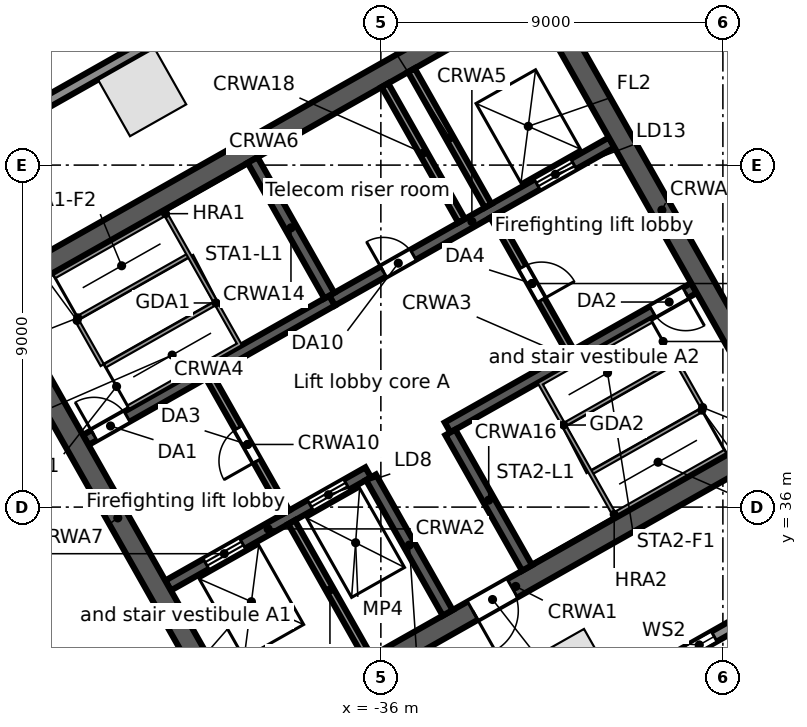
"""IFC4 building model, lengths in metres.
Left out: names, types, materials, properties, quantities, classifications, styles, units other than length and angle.
Written with IfcOpenShell. Run it as: python <this file> out.ifc"""

import sys

from ifc_helpers import new_model, si_unit, direction, frame, frame_2d, origin, origin_2d, place, context, subcontext, project, spatial, rectangle, extrude, element, fill, save


model = new_model("IFC4")
c1 = context("Model", 3, precision=1e-05, world=origin(), true_north=direction((0.0, 1.0)))
c2 = subcontext(c1, "Body", "Model", "MODEL_VIEW")
j1 = project(units=[si_unit("LENGTHUNIT", "METRE"), si_unit("PLANEANGLEUNIT", "RADIAN")], contexts=[c1])
p1 = place(None, origin())
s1 = spatial("IfcSite", under=j1, at=p1, CompositionType="ELEMENT")
p2 = place(p1, origin())
s2 = spatial("IfcBuilding", under=s1, at=p2, CompositionType="ELEMENT")
p3 = place(p2, frame((0.0, 0.0, 123.5)))
s3 = spatial("IfcBuildingStorey", under=s2, at=p3, CompositionType="ELEMENT", Elevation=123.5)
for number, where, z_axis, x_axis in (
    (1, (-42.28, 46.919, 0.0), (0.0, 0.0, 1.0), (-0.87, -0.492, 0.0)),
    (2, (-30.976, 31.635, 0.0), (0.0, 0.0, 1.0), (0.87, 0.492, 0.0)),
):
    element("IfcColumn", number, at=place(p3, frame(where, z_axis=z_axis, x_axis=x_axis)), inside=s3, PredefinedType="COLUMN", context=c2, shape_type="SweptSolid", body=[
        extrude(rectangle(XDim=1.7, YDim=1.7, at=origin_2d()), origin(), (0.0, 0.0, 1.0), 4.4),
    ])
p4 = place(p3, frame((-58.745, 38.764, 0.0), z_axis=(0.0, 0.0, 1.0), x_axis=(0.870355811726, 0.492423355453, 0.0)))
e3 = element("IfcWall", 3, at=p4, inside=s3, PredefinedType="STANDARD", context=c2, shape_type="SweptSolid", body=[
    extrude(rectangle(XDim=64.025, YDim=0.3, at=frame_2d((32.013, 0.0))), origin(), (0.0, 0.0, 1.0), 4.08),
])
p5 = place(p4, frame((60.122, 0.0, 0.6)))
e4 = element("IfcOpeningElement", 4, at=p5, cuts=e3, PredefinedType="OPENING", context=c2, shape_type="SweptSolid", body=[
    extrude(rectangle(XDim=0.9, YDim=2.8, at=frame_2d((0.45, 1.4))), frame((0.0, 0.16, 0.0), z_axis=(0.0, -1.0, 0.0), x_axis=(1.0, 0.0, 0.0)), (0.0, 0.0, 1.0), 0.32),
])
p6 = place(p4, frame((50.992, 0.0, 0.6)))
e5 = element("IfcOpeningElement", 5, at=p6, cuts=e3, PredefinedType="OPENING", context=c2, shape_type="SweptSolid", body=[
    extrude(rectangle(XDim=0.9, YDim=2.8, at=frame_2d((0.45, 1.4))), frame((0.0, 0.16, 0.0), z_axis=(0.0, -1.0, 0.0), x_axis=(1.0, 0.0, 0.0)), (0.0, 0.0, 1.0), 0.32),
])
p7 = place(p4, frame((41.862, 0.0, 0.6)))
e6 = element("IfcOpeningElement", 6, at=p7, cuts=e3, PredefinedType="OPENING", context=c2, shape_type="SweptSolid", body=[
    extrude(rectangle(XDim=0.9, YDim=2.8, at=frame_2d((0.45, 1.4))), frame((0.0, 0.16, 0.0), z_axis=(0.0, -1.0, 0.0), x_axis=(1.0, 0.0, 0.0)), (0.0, 0.0, 1.0), 0.32),
])
p8 = place(p4, frame((32.732, 0.0, 0.6)))
e7 = element("IfcOpeningElement", 7, at=p8, cuts=e3, PredefinedType="OPENING", context=c2, shape_type="SweptSolid", body=[
    extrude(rectangle(XDim=0.9, YDim=2.8, at=frame_2d((0.45, 1.4))), frame((0.0, 0.16, 0.0), z_axis=(0.0, -1.0, 0.0), x_axis=(1.0, 0.0, 0.0)), (0.0, 0.0, 1.0), 0.32),
])
p9 = place(p4, frame((23.602, 0.0, 0.6)))
e8 = element("IfcOpeningElement", 8, at=p9, cuts=e3, PredefinedType="OPENING", context=c2, shape_type="SweptSolid", body=[
    extrude(rectangle(XDim=0.9, YDim=2.8, at=frame_2d((0.45, 1.4))), frame((0.0, 0.16, 0.0), z_axis=(0.0, -1.0, 0.0), x_axis=(1.0, 0.0, 0.0)), (0.0, 0.0, 1.0), 0.32),
])
p10 = place(p4, frame((14.472, 0.0, 0.6)))
e9 = element("IfcOpeningElement", 9, at=p10, cuts=e3, PredefinedType="OPENING", context=c2, shape_type="SweptSolid", body=[
    extrude(rectangle(XDim=0.9, YDim=2.8, at=frame_2d((0.45, 1.4))), frame((0.0, 0.16, 0.0), z_axis=(0.0, -1.0, 0.0), x_axis=(1.0, 0.0, 0.0)), (0.0, 0.0, 1.0), 0.32),
])
p11 = place(p4, frame((5.342, 0.0, 0.6)))
e10 = element("IfcOpeningElement", 10, at=p11, cuts=e3, PredefinedType="OPENING", context=c2, shape_type="SweptSolid", body=[
    extrude(rectangle(XDim=0.9, YDim=2.8, at=frame_2d((0.45, 1.4))), frame((0.0, 0.16, 0.0), z_axis=(0.0, -1.0, 0.0), x_axis=(1.0, 0.0, 0.0)), (0.0, 0.0, 1.0), 0.32),
])
p12 = place(p3, frame((-44.109, 26.504, 0.0), z_axis=(0.0, 0.0, 1.0), x_axis=(-0.857169502585, 0.515034410344, 0.0)))
e11 = element("IfcWall", 11, at=p12, inside=s3, PredefinedType="STANDARD", context=c2, shape_type="SweptSolid", body=[
    extrude(rectangle(XDim=17.127, YDim=0.3, at=frame_2d((8.563, 0.0))), origin(), (0.0, 0.0, 1.0), 4.08),
])
p13 = place(p12, frame((13.403, 0.0, 0.6)))
e12 = element("IfcOpeningElement", 12, at=p13, cuts=e11, PredefinedType="OPENING", context=c2, shape_type="SweptSolid", body=[
    extrude(rectangle(XDim=0.9, YDim=2.8, at=frame_2d((0.45, 1.4))), frame((0.0, 0.16, 0.0), z_axis=(0.0, -1.0, 0.0), x_axis=(1.0, 0.0, 0.0)), (0.0, 0.0, 1.0), 0.32),
])
p14 = place(p12, frame((4.903, 0.0, 0.6)))
e13 = element("IfcOpeningElement", 13, at=p14, cuts=e11, PredefinedType="OPENING", context=c2, shape_type="SweptSolid", body=[
    extrude(rectangle(XDim=0.9, YDim=2.8, at=frame_2d((0.45, 1.4))), frame((0.0, 0.16, 0.0), z_axis=(0.0, -1.0, 0.0), x_axis=(1.0, 0.0, 0.0)), (0.0, 0.0, 1.0), 0.32),
])
p15 = place(p3, frame((-0.055, 47.969, 0.0), z_axis=(0.0, 0.0, 1.0), x_axis=(-0.870355730478, -0.492423499058, 0.0)))
e14 = element("IfcWall", 14, at=p15, inside=s3, PredefinedType="STANDARD", context=c2, shape_type="SweptSolid", body=[
    extrude(rectangle(XDim=43.75, YDim=0.3, at=frame_2d((21.875, 0.0))), origin(), (0.0, 0.0, 1.0), 4.08),
])
p16 = place(p15, frame((39.977, 0.0, 0.6)))
e15 = element("IfcOpeningElement", 15, at=p16, cuts=e14, PredefinedType="OPENING", context=c2, shape_type="SweptSolid", body=[
    extrude(rectangle(XDim=0.9, YDim=2.8, at=frame_2d((0.45, 1.4))), frame((0.0, 0.16, 0.0), z_axis=(0.0, -1.0, 0.0), x_axis=(1.0, 0.0, 0.0)), (0.0, 0.0, 1.0), 0.32),
])
p17 = place(p15, frame((31.222, 0.0, 0.6)))
e16 = element("IfcOpeningElement", 16, at=p17, cuts=e14, PredefinedType="OPENING", context=c2, shape_type="SweptSolid", body=[
    extrude(rectangle(XDim=0.9, YDim=2.8, at=frame_2d((0.45, 1.4))), frame((0.0, 0.16, 0.0), z_axis=(0.0, -1.0, 0.0), x_axis=(1.0, 0.0, 0.0)), (0.0, 0.0, 1.0), 0.32),
])
p18 = place(p15, frame((22.468, 0.0, 0.6)))
e17 = element("IfcOpeningElement", 17, at=p18, cuts=e14, PredefinedType="OPENING", context=c2, shape_type="SweptSolid", body=[
    extrude(rectangle(XDim=0.9, YDim=2.8, at=frame_2d((0.45, 1.4))), frame((0.0, 0.16, 0.0), z_axis=(0.0, -1.0, 0.0), x_axis=(1.0, 0.0, 0.0)), (0.0, 0.0, 1.0), 0.32),
])
p19 = place(p15, frame((13.713, 0.0, 0.6)))
e18 = element("IfcOpeningElement", 18, at=p19, cuts=e14, PredefinedType="OPENING", context=c2, shape_type="SweptSolid", body=[
    extrude(rectangle(XDim=0.9, YDim=2.8, at=frame_2d((0.45, 1.4))), frame((0.0, 0.16, 0.0), z_axis=(0.0, -1.0, 0.0), x_axis=(1.0, 0.0, 0.0)), (0.0, 0.0, 1.0), 0.32),
])
p20 = place(p15, frame((4.959, 0.0, 0.6)))
e19 = element("IfcOpeningElement", 19, at=p20, cuts=e14, PredefinedType="OPENING", context=c2, shape_type="SweptSolid", body=[
    extrude(rectangle(XDim=0.9, YDim=2.8, at=frame_2d((0.45, 1.4))), frame((0.0, 0.16, 0.0), z_axis=(0.0, -1.0, 0.0), x_axis=(1.0, 0.0, 0.0)), (0.0, 0.0, 1.0), 0.32),
])
p21 = place(p3, frame((-39.85, 29.727, 0.0), z_axis=(0.0, 0.0, 1.0), x_axis=(0.870359753402, 0.492416388494, 0.0)))
e20 = element("IfcWall", 20, at=p21, inside=s3, PredefinedType="SOLIDWALL", context=c2, shape_type="SweptSolid", body=[
    extrude(rectangle(XDim=17.0, YDim=0.55, at=frame_2d((8.5, 0.0))), origin(), (0.0, 0.0, 1.0), 4.08),
])
p22 = place(p21, frame((7.2, 0.0, 0.0)))
e21 = element("IfcOpeningElement", 21, at=p22, cuts=e20, PredefinedType="OPENING", context=c2, shape_type="SweptSolid", body=[
    extrude(rectangle(XDim=1.2, YDim=2.1, at=frame_2d((0.6, 1.05))), frame((0.0, 0.285, 0.0), z_axis=(0.0, -1.0, 0.0), x_axis=(1.0, 0.0, 0.0)), (0.0, 0.0, 1.0), 0.57),
])
p23 = place(p3, frame((-41.6, 33.936, 0.0), z_axis=(0.0, 0.0, 1.0), x_axis=(0.870348557882, 0.492436176365, 0.0)))
e22 = element("IfcWall", 22, at=p23, inside=s3, PredefinedType="SOLIDWALL", context=c2, shape_type="SweptSolid", body=[
    extrude(rectangle(XDim=6.05, YDim=0.3, at=frame_2d((3.025, 0.0))), origin(), (0.0, 0.0, 1.0), 4.08),
])
p24 = place(p23, frame((1.15, 0.0, 0.0)))
e23 = element("IfcOpeningElement", 23, at=p24, cuts=e22, PredefinedType="OPENING", context=c2, shape_type="SweptSolid", body=[
    extrude(rectangle(XDim=1.1, YDim=2.1, at=frame_2d((0.55, 1.05))), frame((0.0, 0.16, 0.0), z_axis=(0.0, -1.0, 0.0), x_axis=(1.0, 0.0, 0.0)), (0.0, 0.0, 1.0), 0.32),
])
p25 = place(p23, frame((4.3, 0.0, 0.0)))
e24 = element("IfcOpeningElement", 24, at=p25, cuts=e22, PredefinedType="OPENING", context=c2, shape_type="SweptSolid", body=[
    extrude(rectangle(XDim=1.1, YDim=2.1, at=frame_2d((0.55, 1.05))), frame((0.0, 0.16, 0.0), z_axis=(0.0, -1.0, 0.0), x_axis=(1.0, 0.0, 0.0)), (0.0, 0.0, 1.0), 0.32),
])
p26 = place(p3, frame((-34.245, 38.097, 0.0), z_axis=(0.0, 0.0, 1.0), x_axis=(0.870360741098, 0.49241464271, 0.0)))
e25 = element("IfcWall", 25, at=p26, inside=s3, PredefinedType="SOLIDWALL", context=c2, shape_type="SweptSolid", body=[
    extrude(rectangle(XDim=7.45, YDim=0.3, at=frame_2d((3.725, 0.0))), origin(), (0.0, 0.0, 1.0), 4.08),
])
p27 = place(p26, frame((6.2, 0.0, 0.0)))
e26 = element("IfcOpeningElement", 26, at=p27, cuts=e25, PredefinedType="OPENING", context=c2, shape_type="SweptSolid", body=[
    extrude(rectangle(XDim=1.0, YDim=2.1, at=frame_2d((0.5, 1.05))), frame((0.0, 0.16, 0.0), z_axis=(0.0, -1.0, 0.0), x_axis=(1.0, 0.0, 0.0)), (0.0, 0.0, 1.0), 0.32),
])
p28 = place(p3, frame((-43.766, 37.766, 0.0), z_axis=(0.0, 0.0, 1.0), x_axis=(0.870346696097, 0.492439466932, 0.0)))
e27 = element("IfcWall", 27, at=p28, inside=s3, PredefinedType="SOLIDWALL", context=c2, shape_type="SweptSolid", body=[
    extrude(rectangle(XDim=7.45, YDim=0.3, at=frame_2d((3.725, 0.0))), origin(), (0.0, 0.0, 1.0), 4.08),
])
p29 = place(p28, frame((0.25, 0.0, 0.0)))
e28 = element("IfcOpeningElement", 28, at=p29, cuts=e27, PredefinedType="OPENING", context=c2, shape_type="SweptSolid", body=[
    extrude(rectangle(XDim=1.0, YDim=2.1, at=frame_2d((0.5, 1.05))), frame((0.0, 0.16, 0.0), z_axis=(0.0, -1.0, 0.0), x_axis=(1.0, 0.0, 0.0)), (0.0, 0.0, 1.0), 0.32),
])
p30 = place(p3, frame((-37.282, 41.435, 0.0), z_axis=(0.0, 0.0, 1.0), x_axis=(0.870359895813, 0.492416136779, 0.0)))
e29 = element("IfcWall", 29, at=p30, inside=s3, PredefinedType="SOLIDWALL", context=c2, shape_type="SweptSolid", body=[
    extrude(rectangle(XDim=8.45, YDim=0.3, at=frame_2d((4.225, 0.0))), origin(), (0.0, 0.0, 1.0), 4.08),
])
p31 = place(p30, frame((6.2, 0.0, 0.0)))
e30 = element("IfcOpeningElement", 30, at=p31, cuts=e29, PredefinedType="OPENING", context=c2, shape_type="SweptSolid", body=[
    extrude(rectangle(XDim=1.1, YDim=2.1, at=frame_2d((0.55, 1.05))), frame((0.0, 0.16, 0.0), z_axis=(0.0, -1.0, 0.0), x_axis=(1.0, 0.0, 0.0)), (0.0, 0.0, 1.0), 0.32),
])
p32 = place(p30, frame((1.55, 0.0, 0.0)))
e31 = element("IfcOpeningElement", 31, at=p32, cuts=e29, PredefinedType="OPENING", context=c2, shape_type="SweptSolid", body=[
    extrude(rectangle(XDim=0.9, YDim=2.1, at=frame_2d((0.45, 1.05))), frame((0.0, 0.16, 0.0), z_axis=(0.0, -1.0, 0.0), x_axis=(1.0, 0.0, 0.0)), (0.0, 0.0, 1.0), 0.32),
])
p33 = place(p3, frame((-46.473, 41.434, 0.0), z_axis=(0.0, 0.0, 1.0), x_axis=(0.870359753402, 0.492416388494, 0.0)))
e32 = element("IfcWall", 32, at=p33, inside=s3, PredefinedType="SOLIDWALL", context=c2, shape_type="SweptSolid", body=[
    extrude(rectangle(XDim=17.0, YDim=0.55, at=frame_2d((8.5, 0.0))), origin(), (0.0, 0.0, 1.0), 4.08),
])
p34 = place(p3, frame((-46.098, 41.33, 0.0), z_axis=(0.0, 0.0, 1.0), x_axis=(0.492418910884, -0.870358326325, 0.0)))
e33 = element("IfcWall", 33, at=p34, inside=s3, PredefinedType="SOLIDWALL", context=c2, shape_type="SweptSolid", body=[
    extrude(rectangle(XDim=12.9, YDim=0.55, at=frame_2d((6.45, 0.0))), origin(), (0.0, 0.0, 1.0), 4.08),
])
p35 = place(p3, frame((-38.349, 35.603, 0.0), z_axis=(0.0, 0.0, 1.0), x_axis=(0.492382931784, -0.870378681085, 0.0)))
e34 = element("IfcWall", 34, at=p35, inside=s3, PredefinedType="SOLIDWALL", context=c2, shape_type="SweptSolid", body=[
    extrude(rectangle(XDim=4.1, YDim=0.2, at=frame_2d((2.05, 0.0))), origin(), (0.0, 0.0, 1.0), 4.08),
])
p36 = place(p3, frame((-40.516, 39.433, 0.0), z_axis=(0.0, 0.0, 1.0), x_axis=(0.492453559952, -0.87033872216, 0.0)))
e35 = element("IfcWall", 35, at=p36, inside=s3, PredefinedType="PARTITIONING", context=c2, shape_type="SweptSolid", body=[
    extrude(rectangle(XDim=4.1, YDim=0.2, at=frame_2d((2.05, 0.0))), origin(), (0.0, 0.0, 1.0), 4.08),
])
p37 = place(p36, frame((1.55, 0.0, 0.0)))
e36 = element("IfcOpeningElement", 36, at=p37, cuts=e35, PredefinedType="OPENING", context=c2, shape_type="SweptSolid", body=[
    extrude(rectangle(XDim=1.0, YDim=2.1, at=frame_2d((0.5, 1.05))), frame((0.0, 0.11, 0.0), z_axis=(0.0, -1.0, 0.0), x_axis=(1.0, 0.0, 0.0)), (0.0, 0.0, 1.0), 0.22),
])
p38 = place(p3, frame((-36.26, 36.785, 0.0), z_axis=(0.0, 0.0, 1.0), x_axis=(0.492408451753, -0.87036424366, 0.0)))
e37 = element("IfcWall", 37, at=p38, inside=s3, PredefinedType="SOLIDWALL", context=c2, shape_type="SweptSolid", body=[
    extrude(rectangle(XDim=4.1, YDim=0.3, at=frame_2d((2.05, 0.0))), origin(), (0.0, 0.0, 1.0), 4.08),
])
for number, where, z_axis, x_axis in (
    (38, (-39.375, 45.134, 0.0), (0.0, 0.0, 1.0), (0.492, -0.87, 0.0)),
    (39, (-34.171, 37.967, 0.0), (0.0, 0.0, 1.0), (0.492, -0.87, 0.0)),
):
    element("IfcWall", number, at=place(p3, frame(where, z_axis=z_axis, x_axis=x_axis)), inside=s3, PredefinedType="SOLIDWALL", context=c2, shape_type="SweptSolid", body=[
        extrude(rectangle(XDim=4.1, YDim=0.3, at=frame_2d((2.05, 0.0))), origin(), (0.0, 0.0, 1.0), 4.08),
    ])
p39 = place(p3, frame((-35.894, 47.103, 0.0), z_axis=(0.0, 0.0, 1.0), x_axis=(0.492428039142, -0.870353161807, 0.0)))
e40 = element("IfcWall", 40, at=p39, inside=s3, PredefinedType="SOLIDWALL", context=c2, shape_type="SweptSolid", body=[
    extrude(rectangle(XDim=4.1, YDim=0.2, at=frame_2d((2.05, 0.0))), origin(), (0.0, 0.0, 1.0), 4.08),
])
p40 = place(p3, frame((-33.031, 43.667, 0.0), z_axis=(0.0, 0.0, 1.0), x_axis=(0.492408451753, -0.87036424366, 0.0)))
e41 = element("IfcWall", 41, at=p40, inside=s3, PredefinedType="PARTITIONING", context=c2, shape_type="SweptSolid", body=[
    extrude(rectangle(XDim=4.1, YDim=0.2, at=frame_2d((2.05, 0.0))), origin(), (0.0, 0.0, 1.0), 4.08),
])
p41 = place(p40, frame((1.55, 0.0, 0.0)))
e42 = element("IfcOpeningElement", 42, at=p41, cuts=e41, PredefinedType="OPENING", context=c2, shape_type="SweptSolid", body=[
    extrude(rectangle(XDim=1.0, YDim=2.1, at=frame_2d((0.5, 1.05))), frame((0.0, 0.11, 0.0), z_axis=(0.0, -1.0, 0.0), x_axis=(1.0, 0.0, 0.0)), (0.0, 0.0, 1.0), 0.22),
])
p42 = place(p3, frame((-35.197, 47.497, 0.0), z_axis=(0.0, 0.0, 1.0), x_axis=(0.492453559952, -0.87033872216, 0.0)))
e43 = element("IfcWall", 43, at=p42, inside=s3, PredefinedType="SOLIDWALL", context=c2, shape_type="SweptSolid", body=[
    extrude(rectangle(XDim=4.1, YDim=0.2, at=frame_2d((2.05, 0.0))), origin(), (0.0, 0.0, 1.0), 4.08),
])
p43 = place(p3, frame((-31.781, 49.43, 0.0), z_axis=(0.0, 0.0, 1.0), x_axis=(0.492427022044, -0.870353737259, 0.0)))
e44 = element("IfcWall", 44, at=p43, inside=s3, PredefinedType="SOLIDWALL", context=c2, shape_type="SweptSolid", body=[
    extrude(rectangle(XDim=12.9, YDim=0.55, at=frame_2d((6.45, 0.0))), origin(), (0.0, 0.0, 1.0), 4.08),
])
p44 = place(p17, origin())
e45 = element("IfcWindow", 45, at=p44, inside=s3, PartitioningType="SINGLE_PANEL", PredefinedType="WINDOW", context=c2, shape_type="SweptSolid", body=[
    extrude(rectangle(XDim=0.9, YDim=2.8, at=frame_2d((0.45, 1.4))), frame((0.0, 0.03, 0.0), z_axis=(0.0, -1.0, 0.0), x_axis=(1.0, 0.0, 0.0)), (0.0, 0.0, 1.0), 0.06),
])
fill(e16, e45)
p45 = place(p31, origin())
e46 = element("IfcDoor", 46, at=p45, inside=s3, OperationType="DOUBLE_DOOR_SLIDING", PredefinedType="DOOR", context=c2, shape_type="SweptSolid", body=[
    extrude(rectangle(XDim=1.1, YDim=2.1, at=frame_2d((0.55, 1.05))), frame((0.0, 0.025, 0.0), z_axis=(0.0, -1.0, 0.0), x_axis=(1.0, 0.0, 0.0)), (0.0, 0.0, 1.0), 0.05),
])
fill(e30, e46)
p46 = place(p24, origin())
e47 = element("IfcDoor", 47, at=p46, inside=s3, OperationType="DOUBLE_DOOR_SLIDING", PredefinedType="DOOR", context=c2, shape_type="SweptSolid", body=[
    extrude(rectangle(XDim=1.1, YDim=2.1, at=frame_2d((0.55, 1.05))), frame((0.0, 0.025, 0.0), z_axis=(0.0, -1.0, 0.0), x_axis=(1.0, 0.0, 0.0)), (0.0, 0.0, 1.0), 0.05),
])
fill(e23, e47)
p47 = place(p25, origin())
e48 = element("IfcDoor", 48, at=p47, inside=s3, OperationType="DOUBLE_DOOR_SLIDING", PredefinedType="DOOR", context=c2, shape_type="SweptSolid", body=[
    extrude(rectangle(XDim=1.1, YDim=2.1, at=frame_2d((0.55, 1.05))), frame((0.0, 0.025, 0.0), z_axis=(0.0, -1.0, 0.0), x_axis=(1.0, 0.0, 0.0)), (0.0, 0.0, 1.0), 0.05),
])
fill(e24, e48)
p48 = place(p29, origin())
e49 = element("IfcDoor", 49, at=p48, inside=s3, OperationType="SINGLE_SWING_LEFT", PredefinedType="DOOR", context=c2, shape_type="SweptSolid", body=[
    extrude(rectangle(XDim=1.0, YDim=2.1, at=frame_2d((0.5, 1.05))), frame((0.0, 0.025, 0.0), z_axis=(0.0, -1.0, 0.0), x_axis=(1.0, 0.0, 0.0)), (0.0, 0.0, 1.0), 0.05),
])
fill(e28, e49)
p49 = place(p27, frame((1.0, 0.0, 0.0), z_axis=(0.0, 0.0, 1.0), x_axis=(-1.0, 0.0, 0.0)))
e50 = element("IfcDoor", 50, at=p49, inside=s3, OperationType="SINGLE_SWING_LEFT", PredefinedType="DOOR", context=c2, shape_type="SweptSolid", body=[
    extrude(rectangle(XDim=1.0, YDim=2.1, at=frame_2d((0.5, 1.05))), frame((0.0, 0.025, 0.0), z_axis=(0.0, -1.0, 0.0), x_axis=(1.0, 0.0, 0.0)), (0.0, 0.0, 1.0), 0.05),
])
fill(e26, e50)
p50 = place(p37, frame((1.0, 0.0, 0.0), z_axis=(0.0, 0.0, 1.0), x_axis=(-1.0, 0.0, 0.0)))
e51 = element("IfcDoor", 51, at=p50, inside=s3, OperationType="SINGLE_SWING_LEFT", PredefinedType="DOOR", context=c2, shape_type="SweptSolid", body=[
    extrude(rectangle(XDim=1.0, YDim=2.1, at=frame_2d((0.5, 1.05))), frame((0.0, 0.025, 0.0), z_axis=(0.0, -1.0, 0.0), x_axis=(1.0, 0.0, 0.0)), (0.0, 0.0, 1.0), 0.05),
])
fill(e36, e51)
p51 = place(p41, origin())
e52 = element("IfcDoor", 52, at=p51, inside=s3, OperationType="SINGLE_SWING_RIGHT", PredefinedType="DOOR", context=c2, shape_type="SweptSolid", body=[
    extrude(rectangle(XDim=1.0, YDim=2.1, at=frame_2d((0.5, 1.05))), frame((0.0, 0.025, 0.0), z_axis=(0.0, -1.0, 0.0), x_axis=(1.0, 0.0, 0.0)), (0.0, 0.0, 1.0), 0.05),
])
fill(e42, e52)
p52 = place(p22, frame((1.2, 0.0, 0.0), z_axis=(0.0, 0.0, 1.0), x_axis=(-1.0, 0.0, 0.0)))
e53 = element("IfcDoor", 53, at=p52, inside=s3, OperationType="SINGLE_SWING_RIGHT", PredefinedType="DOOR", context=c2, shape_type="SweptSolid", body=[
    extrude(rectangle(XDim=1.2, YDim=2.1, at=frame_2d((0.6, 1.05))), frame((0.0, 0.025, 0.0), z_axis=(0.0, -1.0, 0.0), x_axis=(1.0, 0.0, 0.0)), (0.0, 0.0, 1.0), 0.05),
])
fill(e21, e53)
p53 = place(p32, origin())
e54 = element("IfcDoor", 54, at=p53, inside=s3, OperationType="SINGLE_SWING_LEFT", PredefinedType="DOOR", context=c2, shape_type="SweptSolid", body=[
    extrude(rectangle(XDim=0.9, YDim=2.1, at=frame_2d((0.45, 1.05))), frame((0.0, 0.025, 0.0), z_axis=(0.0, -1.0, 0.0), x_axis=(1.0, 0.0, 0.0)), (0.0, 0.0, 1.0), 0.05),
])
fill(e31, e54)
save(model, sys.argv[1])
